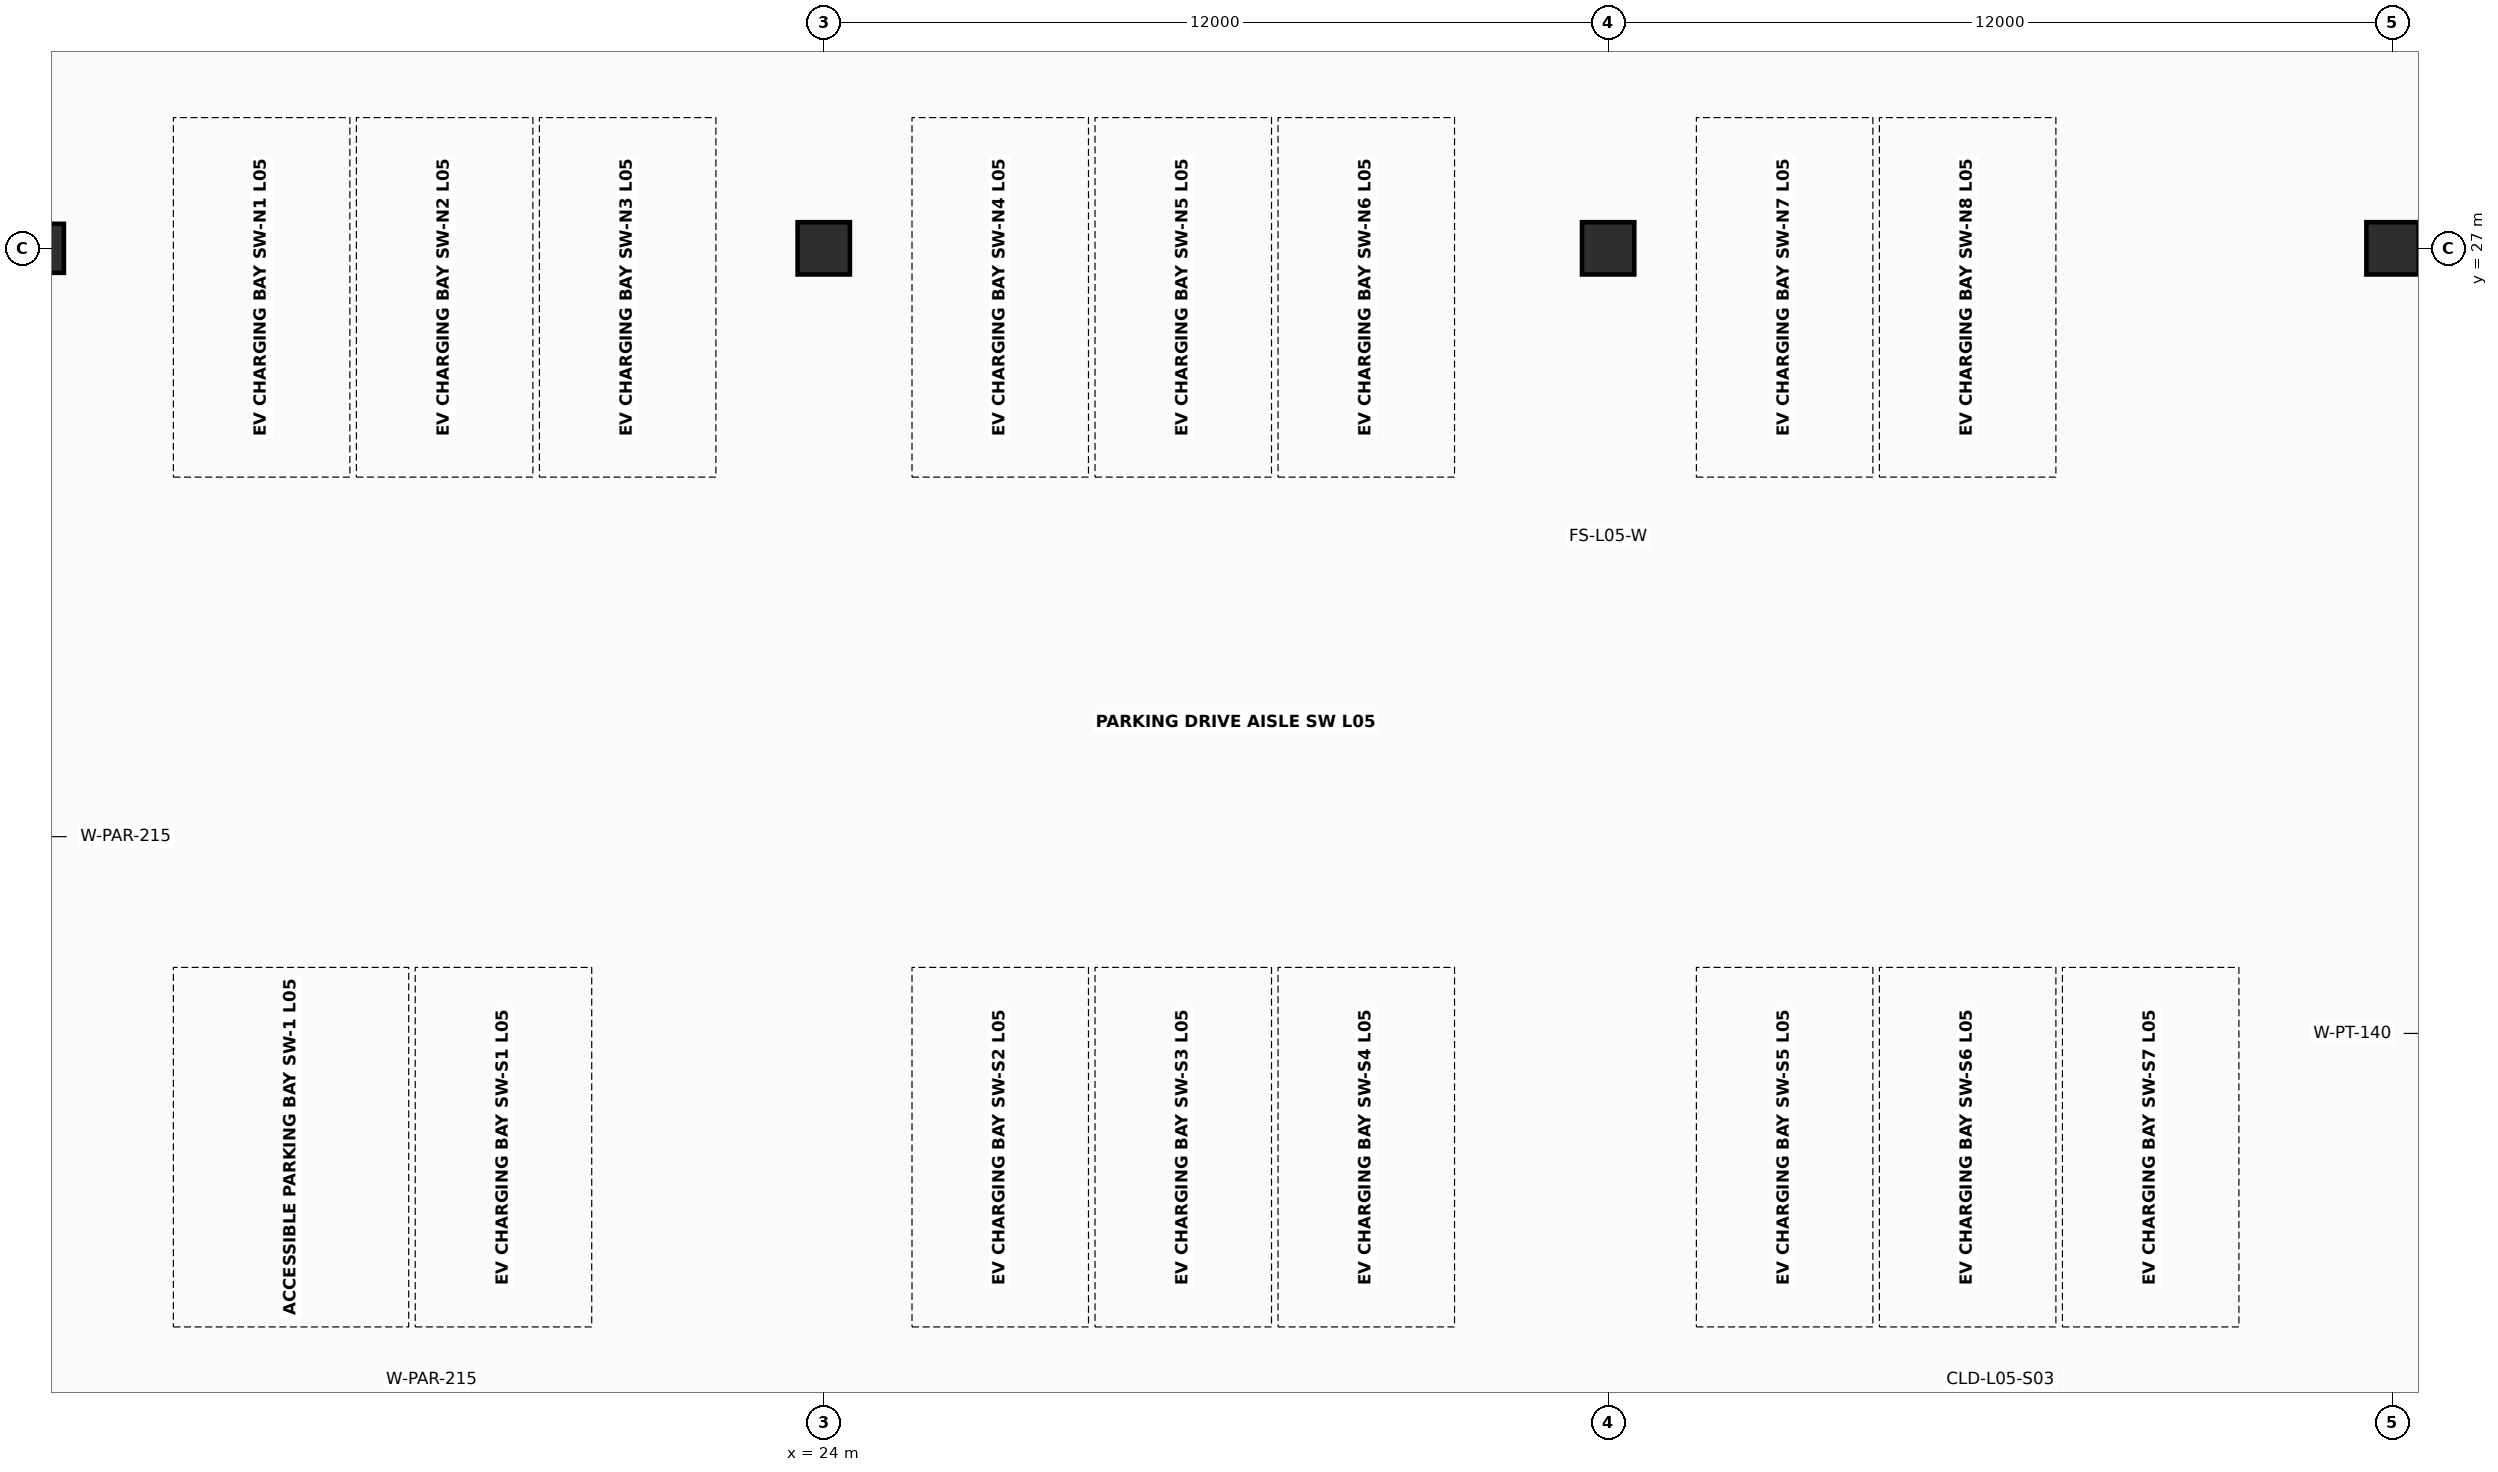
"""IFC4 building model, lengths in metres.
Left out: names, types, materials, properties, quantities, classifications, styles, units other than length and angle.
Written with IfcOpenShell. Run it as: python <this file> out.ifc"""

import sys

from ifc_helpers import new_model, si_unit, direction, frame, origin, origin_2d, place, context, subcontext, project, spatial, rectangle, extrude, element, save


model = new_model("IFC4")
c1 = context("Model", 3, precision=1e-05, world=origin(), true_north=direction((0.0, 1.0)))
c2 = subcontext(c1, "Body", "Model", "MODEL_VIEW")
j1 = project(units=[si_unit("LENGTHUNIT", "METRE"), si_unit("PLANEANGLEUNIT", "RADIAN")], contexts=[c1])
p1 = place(None, origin())
s1 = spatial("IfcSite", under=j1, at=p1, CompositionType="ELEMENT")
p2 = place(p1, origin())
s2 = spatial("IfcBuilding", under=s1, at=p2, CompositionType="ELEMENT")
p3 = place(p2, frame((0.0, 0.0, 21.0)))
s3 = spatial("IfcBuildingStorey", under=s2, at=p3, CompositionType="ELEMENT", Elevation=21.0)
p4 = place(p3, frame((12.0, 27.0, 0.0), z_axis=(0.0, 0.0, 1.0), x_axis=(1.0, 0.0, 0.0)))
e1 = element("IfcColumn", 1, at=p4, inside=s3, PredefinedType="COLUMN", context=c2, shape_type="SweptSolid", body=[
    extrude(rectangle(XDim=0.75, YDim=0.75, at=origin_2d()), origin(), (0.0, 0.0, 1.0), 3.8),
])
for number, where, z_axis, x_axis in (
    (2, (24.0, 27.0, 0.0), (0.0, 0.0, 1.0), (1.0, 0.0, 0.0)),
    (3, (36.0, 27.0, 0.0), (0.0, 0.0, 1.0), (1.0, 0.0, 0.0)),
    (4, (48.0, 27.0, 0.0), (0.0, 0.0, 1.0), (1.0, 0.0, 0.0)),
):
    element("IfcColumn", number, at=place(p3, frame(where, z_axis=z_axis, x_axis=x_axis)), inside=s3, PredefinedType="COLUMN", context=c2, shape_type="SweptSolid", body=[
        extrude(rectangle(XDim=0.8, YDim=0.8, at=origin_2d()), origin(), (0.0, 0.0, 1.0), 3.8),
    ])
save(model, sys.argv[1])
